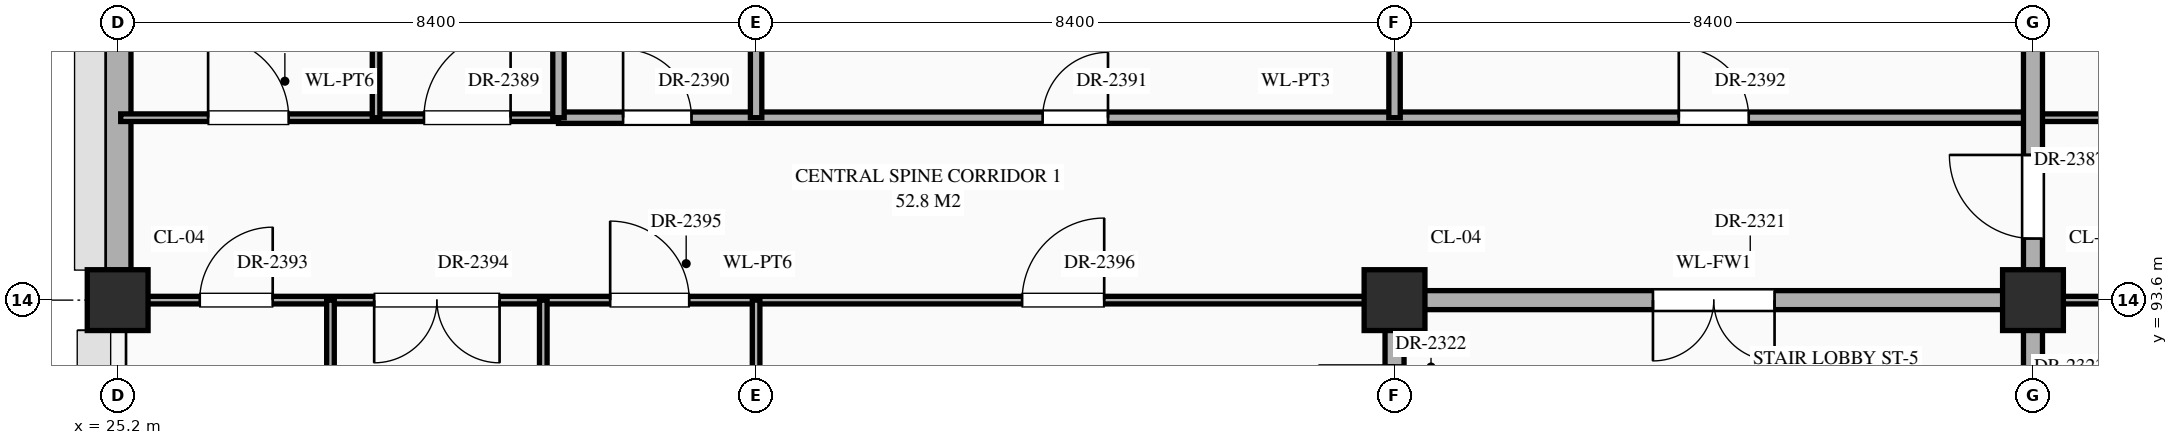
"""IFC4 building model, lengths in metres.
Left out: names, types, materials, properties, quantities, classifications, styles, units other than length and angle.
Written with IfcOpenShell. Run it as: python <this file> out.ifc"""

import sys

from ifc_helpers import new_model, si_unit, direction, frame, frame_2d, origin, origin_2d, place, context, subcontext, project, spatial, rectangle, extrude, element, fill, save


model = new_model("IFC4")
c1 = context("Model", 3, precision=1e-05, world=origin(), true_north=direction((0.0, 1.0)))
c2 = subcontext(c1, "Body", "Model", "MODEL_VIEW")
j1 = project(units=[si_unit("LENGTHUNIT", "METRE"), si_unit("PLANEANGLEUNIT", "RADIAN")], contexts=[c1])
p1 = place(None, origin())
s1 = spatial("IfcSite", under=j1, at=p1, CompositionType="ELEMENT")
p2 = place(p1, origin())
s2 = spatial("IfcBuilding", under=s1, at=p2, CompositionType="ELEMENT")
p3 = place(p2, frame((0.0, 0.0, 30.6)))
s3 = spatial("IfcBuildingStorey", under=s2, at=p3, CompositionType="ELEMENT", Elevation=30.6)
for number, where, z_axis, x_axis in (
    (1, (25.2, 93.6, 0.0), (0.0, 0.0, 1.0), (1.0, 0.0, 0.0)),
    (2, (42.0, 93.6, 0.0), (0.0, 0.0, 1.0), (1.0, 0.0, 0.0)),
    (3, (50.4, 93.6, 0.0), (0.0, 0.0, 1.0), (1.0, 0.0, 0.0)),
):
    element("IfcColumn", number, at=place(p3, frame(where, z_axis=z_axis, x_axis=x_axis)), inside=s3, PredefinedType="COLUMN", context=c2, shape_type="SweptSolid", body=[
        extrude(rectangle(XDim=0.8, YDim=0.8, at=origin_2d()), origin(), (0.0, 0.0, 1.0), 4.5),
    ])
p4 = place(p3, frame((25.2, 93.995, 0.0), z_axis=(0.0, 0.0, 1.0), x_axis=(0.0, 1.0, 0.0)))
e4 = element("IfcWall", 4, at=p4, inside=s3, PredefinedType="STANDARD", context=c2, shape_type="SweptSolid", body=[
    extrude(rectangle(XDim=6.41, YDim=0.35, at=frame_2d((3.205, 0.0))), origin(), (0.0, 0.0, 1.0), 3.65),
])
p5 = place(p4, frame((3.73, 0.0, 0.85)))
e5 = element("IfcOpeningElement", 5, at=p5, cuts=e4, PredefinedType="OPENING", context=c2, shape_type="SweptSolid", body=[
    extrude(rectangle(XDim=1.55, YDim=1.38, at=frame_2d((0.775, 0.69))), frame((0.0, 0.187, 0.0), z_axis=(0.0, -1.0, 0.0), x_axis=(1.0, 0.0, 0.0)), (0.0, 0.0, 1.0), 0.374),
])
p6 = place(p3, frame((25.24, 93.6, 0.0), z_axis=(0.0, 0.0, 1.0), x_axis=(1.0, 0.0, 0.0)))
e6 = element("IfcWall", 6, at=p6, inside=s3, PredefinedType="STANDARD", context=c2, shape_type="SweptSolid", body=[
    extrude(rectangle(XDim=16.76, YDim=0.1, at=frame_2d((8.38, 0.0))), origin(), (0.0, 0.0, 1.0), 3.1),
])
p7 = place(p6, frame((1.04, 0.0, 0.0)))
e7 = element("IfcOpeningElement", 7, at=p7, cuts=e6, PredefinedType="OPENING", context=c2, shape_type="SweptSolid", body=[
    extrude(rectangle(XDim=0.96, YDim=2.2, at=frame_2d((0.48, 1.1))), frame((0.0, 0.062, 0.0), z_axis=(0.0, -1.0, 0.0), x_axis=(1.0, 0.0, 0.0)), (0.0, 0.0, 1.0), 0.124),
])
p8 = place(p6, frame((3.335, 0.0, 0.0)))
e8 = element("IfcOpeningElement", 8, at=p8, cuts=e6, PredefinedType="OPENING", context=c2, shape_type="SweptSolid", body=[
    extrude(rectangle(XDim=1.65, YDim=2.4, at=frame_2d((0.825, 1.2))), frame((0.0, 0.062, 0.0), z_axis=(0.0, -1.0, 0.0), x_axis=(1.0, 0.0, 0.0)), (0.0, 0.0, 1.0), 0.124),
])
p9 = place(p6, frame((6.44, 0.0, 0.0)))
e9 = element("IfcOpeningElement", 9, at=p9, cuts=e6, PredefinedType="OPENING", context=c2, shape_type="SweptSolid", body=[
    extrude(rectangle(XDim=1.04, YDim=2.2, at=frame_2d((0.52, 1.1))), frame((0.0, 0.062, 0.0), z_axis=(0.0, -1.0, 0.0), x_axis=(1.0, 0.0, 0.0)), (0.0, 0.0, 1.0), 0.124),
])
p10 = place(p6, frame((11.86, 0.0, 0.0)))
e10 = element("IfcOpeningElement", 10, at=p10, cuts=e6, PredefinedType="OPENING", context=c2, shape_type="SweptSolid", body=[
    extrude(rectangle(XDim=1.08, YDim=2.25, at=frame_2d((0.54, 1.125))), frame((0.0, 0.062, 0.0), z_axis=(0.0, -1.0, 0.0), x_axis=(1.0, 0.0, 0.0)), (0.0, 0.0, 1.0), 0.124),
])
p11 = place(p3, frame((42.0, 93.6, 0.0), z_axis=(0.0, 0.0, 1.0), x_axis=(1.0, 0.0, 0.0)))
e11 = element("IfcWall", 11, at=p11, inside=s3, PredefinedType="STANDARD", context=c2, shape_type="SweptSolid", body=[
    extrude(rectangle(XDim=8.4, YDim=0.25, at=frame_2d((4.2, 0.0))), origin(), (0.0, 0.0, 1.0), 3.39),
])
p12 = place(p11, frame((3.4, 0.0, 0.0)))
e12 = element("IfcOpeningElement", 12, at=p12, cuts=e11, PredefinedType="OPENING", context=c2, shape_type="SweptSolid", body=[
    extrude(rectangle(XDim=1.6, YDim=2.3, at=frame_2d((0.8, 1.15))), frame((0.0, 0.137, 0.0), z_axis=(0.0, -1.0, 0.0), x_axis=(1.0, 0.0, 0.0)), (0.0, 0.0, 1.0), 0.274),
])
p13 = place(p3, frame((50.4, 93.6, 0.0), z_axis=(0.0, 0.0, 1.0), x_axis=(1.0, 0.0, 0.0)))
e13 = element("IfcWall", 13, at=p13, inside=s3, PredefinedType="STANDARD", context=c2, shape_type="SweptSolid", body=[
    extrude(rectangle(XDim=8.4, YDim=0.1, at=frame_2d((4.2, 0.0))), origin(), (0.0, 0.0, 1.0), 3.39),
])
p14 = place(p13, frame((1.05, 0.0, 0.0)))
e14 = element("IfcOpeningElement", 14, at=p14, cuts=e13, PredefinedType="OPENING", context=c2, shape_type="SweptSolid", body=[
    extrude(rectangle(XDim=1.02, YDim=2.4, at=frame_2d((0.51, 1.2))), frame((0.0, 0.062, 0.0), z_axis=(0.0, -1.0, 0.0), x_axis=(1.0, 0.0, 0.0)), (0.0, 0.0, 1.0), 0.124),
])
p15 = place(p13, frame((3.67, 0.0, 0.0)))
e15 = element("IfcOpeningElement", 15, at=p15, cuts=e13, PredefinedType="OPENING", context=c2, shape_type="SweptSolid", body=[
    extrude(rectangle(XDim=1.06, YDim=2.4, at=frame_2d((0.53, 1.2))), frame((0.0, 0.062, 0.0), z_axis=(0.0, -1.0, 0.0), x_axis=(1.0, 0.0, 0.0)), (0.0, 0.0, 1.0), 0.124),
])
p16 = place(p13, frame((6.27, 0.0, 0.0)))
e16 = element("IfcOpeningElement", 16, at=p16, cuts=e13, PredefinedType="OPENING", context=c2, shape_type="SweptSolid", body=[
    extrude(rectangle(XDim=1.14, YDim=2.4, at=frame_2d((0.57, 1.2))), frame((0.0, 0.062, 0.0), z_axis=(0.0, -1.0, 0.0), x_axis=(1.0, 0.0, 0.0)), (0.0, 0.0, 1.0), 0.124),
])
p17 = place(p3, frame((25.24, 96.0, 0.0), z_axis=(0.0, 0.0, 1.0), x_axis=(1.0, 0.0, 0.0)))
e17 = element("IfcWall", 17, at=p17, inside=s3, PredefinedType="STANDARD", context=c2, shape_type="SweptSolid", body=[
    extrude(rectangle(XDim=5.76, YDim=0.1, at=frame_2d((2.88, 0.0))), origin(), (0.0, 0.0, 1.0), 4.3),
])
p18 = place(p17, frame((1.15, 0.0, 0.0)))
e18 = element("IfcOpeningElement", 18, at=p18, cuts=e17, PredefinedType="OPENING", context=c2, shape_type="SweptSolid", body=[
    extrude(rectangle(XDim=1.06, YDim=2.4, at=frame_2d((0.53, 1.2))), frame((0.0, 0.062, 0.0), z_axis=(0.0, -1.0, 0.0), x_axis=(1.0, 0.0, 0.0)), (0.0, 0.0, 1.0), 0.124),
])
p19 = place(p17, frame((3.99, 0.0, 0.0)))
e19 = element("IfcOpeningElement", 19, at=p19, cuts=e17, PredefinedType="OPENING", context=c2, shape_type="SweptSolid", body=[
    extrude(rectangle(XDim=1.14, YDim=2.4, at=frame_2d((0.57, 1.2))), frame((0.0, 0.062, 0.0), z_axis=(0.0, -1.0, 0.0), x_axis=(1.0, 0.0, 0.0)), (0.0, 0.0, 1.0), 0.124),
])
p20 = place(p3, frame((31.0, 96.0, 0.0), z_axis=(0.0, 0.0, 1.0), x_axis=(1.0, 0.0, 0.0)))
e20 = element("IfcWall", 20, at=p20, inside=s3, PredefinedType="STANDARD", context=c2, shape_type="SweptSolid", body=[
    extrude(rectangle(XDim=19.4, YDim=0.15, at=frame_2d((9.7, 0.0))), origin(), (0.0, 0.0, 1.0), 4.15),
])
p21 = place(p20, frame((0.85, 0.0, 0.0)))
e21 = element("IfcOpeningElement", 21, at=p21, cuts=e20, PredefinedType="OPENING", context=c2, shape_type="SweptSolid", body=[
    extrude(rectangle(XDim=0.9, YDim=2.15, at=frame_2d((0.45, 1.075))), frame((0.0, 0.087, 0.0), z_axis=(0.0, -1.0, 0.0), x_axis=(1.0, 0.0, 0.0)), (0.0, 0.0, 1.0), 0.174),
])
p22 = place(p20, frame((6.37, 0.0, 0.0)))
e22 = element("IfcOpeningElement", 22, at=p22, cuts=e20, PredefinedType="OPENING", context=c2, shape_type="SweptSolid", body=[
    extrude(rectangle(XDim=0.86, YDim=2.1, at=frame_2d((0.43, 1.05))), frame((0.0, 0.087, 0.0), z_axis=(0.0, -1.0, 0.0), x_axis=(1.0, 0.0, 0.0)), (0.0, 0.0, 1.0), 0.174),
])
p23 = place(p20, frame((14.74, 0.0, 0.0)))
e23 = element("IfcOpeningElement", 23, at=p23, cuts=e20, PredefinedType="OPENING", context=c2, shape_type="SweptSolid", body=[
    extrude(rectangle(XDim=0.92, YDim=2.15, at=frame_2d((0.46, 1.075))), frame((0.0, 0.087, 0.0), z_axis=(0.0, -1.0, 0.0), x_axis=(1.0, 0.0, 0.0)), (0.0, 0.0, 1.0), 0.174),
])
p24 = place(p3, frame((50.4, 96.0, 0.0), z_axis=(0.0, 0.0, 1.0), x_axis=(1.0, 0.0, 0.0)))
e24 = element("IfcWall", 24, at=p24, inside=s3, PredefinedType="STANDARD", context=c2, shape_type="SweptSolid", body=[
    extrude(rectangle(XDim=5.8, YDim=0.1, at=frame_2d((2.9, 0.0))), origin(), (0.0, 0.0, 1.0), 4.24),
])
p25 = place(p24, frame((1.12, 0.0, 0.0)))
e25 = element("IfcOpeningElement", 25, at=p25, cuts=e24, PredefinedType="OPENING", context=c2, shape_type="SweptSolid", body=[
    extrude(rectangle(XDim=1.16, YDim=2.3, at=frame_2d((0.58, 1.15))), frame((0.0, 0.062, 0.0), z_axis=(0.0, -1.0, 0.0), x_axis=(1.0, 0.0, 0.0)), (0.0, 0.0, 1.0), 0.124),
])
p26 = place(p24, frame((4.0, 0.0, 0.0)))
e26 = element("IfcOpeningElement", 26, at=p26, cuts=e24, PredefinedType="OPENING", context=c2, shape_type="SweptSolid", body=[
    extrude(rectangle(XDim=1.2, YDim=2.35, at=frame_2d((0.6, 1.175))), frame((0.0, 0.062, 0.0), z_axis=(0.0, -1.0, 0.0), x_axis=(1.0, 0.0, 0.0)), (0.0, 0.0, 1.0), 0.124),
])
p27 = place(p3, frame((28.0, 86.4, 0.0), z_axis=(0.0, 0.0, 1.0), x_axis=(0.0, 1.0, 0.0)))
e27 = element("IfcWall", 27, at=p27, inside=s3, PredefinedType="STANDARD", context=c2, shape_type="SweptSolid", body=[
    extrude(rectangle(XDim=7.2, YDim=0.1, at=frame_2d((3.6, 0.0))), origin(), (0.0, 0.0, 1.0), 4.3),
])
p28 = place(p27, frame((3.15, 0.0, 0.0)))
e28 = element("IfcOpeningElement", 28, at=p28, cuts=e27, PredefinedType="OPENING", context=c2, shape_type="SweptSolid", body=[
    extrude(rectangle(XDim=0.9, YDim=2.15, at=frame_2d((0.45, 1.075))), frame((0.0, 0.062, 0.0), z_axis=(0.0, -1.0, 0.0), x_axis=(1.0, 0.0, 0.0)), (0.0, 0.0, 1.0), 0.124),
])
p29 = place(p3, frame((28.6, 96.0, 0.0), z_axis=(0.0, 0.0, 1.0), x_axis=(0.0, 1.0, 0.0)))
e29 = element("IfcWall", 29, at=p29, inside=s3, PredefinedType="STANDARD", context=c2, shape_type="SweptSolid", body=[
    extrude(rectangle(XDim=4.8, YDim=0.1, at=frame_2d((2.4, 0.0))), origin(), (0.0, 0.0, 1.0), 4.3),
])
p30 = place(p29, frame((1.84, 0.0, 0.0)))
e30 = element("IfcOpeningElement", 30, at=p30, cuts=e29, PredefinedType="OPENING", context=c2, shape_type="SweptSolid", body=[
    extrude(rectangle(XDim=1.12, YDim=2.25, at=frame_2d((0.56, 1.125))), frame((0.0, 0.062, 0.0), z_axis=(0.0, -1.0, 0.0), x_axis=(1.0, 0.0, 0.0)), (0.0, 0.0, 1.0), 0.124),
])
p31 = place(p3, frame((30.8, 86.4, 0.0), z_axis=(0.0, 0.0, 1.0), x_axis=(0.0, 1.0, 0.0)))
e31 = element("IfcWall", 31, at=p31, inside=s3, PredefinedType="STANDARD", context=c2, shape_type="SweptSolid", body=[
    extrude(rectangle(XDim=7.2, YDim=0.1, at=frame_2d((3.6, 0.0))), origin(), (0.0, 0.0, 1.0), 4.3),
])
p32 = place(p31, frame((3.14, 0.0, 0.0)))
e32 = element("IfcOpeningElement", 32, at=p32, cuts=e31, PredefinedType="OPENING", context=c2, shape_type="SweptSolid", body=[
    extrude(rectangle(XDim=0.92, YDim=2.15, at=frame_2d((0.46, 1.075))), frame((0.0, 0.062, 0.0), z_axis=(0.0, -1.0, 0.0), x_axis=(1.0, 0.0, 0.0)), (0.0, 0.0, 1.0), 0.124),
])
p33 = place(p3, frame((31.0, 96.0, 0.0), z_axis=(0.0, 0.0, 1.0), x_axis=(0.0, 1.0, 0.0)))
e33 = element("IfcWall", 33, at=p33, inside=s3, PredefinedType="STANDARD", context=c2, shape_type="SweptSolid", body=[
    extrude(rectangle(XDim=4.8, YDim=0.15, at=frame_2d((2.4, 0.0))), origin(), (0.0, 0.0, 1.0), 4.3),
])
p34 = place(p33, frame((1.82, 0.0, 0.0)))
e34 = element("IfcOpeningElement", 34, at=p34, cuts=e33, PredefinedType="OPENING", context=c2, shape_type="SweptSolid", body=[
    extrude(rectangle(XDim=1.16, YDim=2.3, at=frame_2d((0.58, 1.15))), frame((0.0, 0.087, 0.0), z_axis=(0.0, -1.0, 0.0), x_axis=(1.0, 0.0, 0.0)), (0.0, 0.0, 1.0), 0.174),
])
p35 = place(p3, frame((33.6, 86.4, 0.0), z_axis=(0.0, 0.0, 1.0), x_axis=(0.0, 1.0, 0.0)))
e35 = element("IfcWall", 35, at=p35, inside=s3, PredefinedType="STANDARD", context=c2, shape_type="SweptSolid", body=[
    extrude(rectangle(XDim=7.2, YDim=0.1, at=frame_2d((3.6, 0.0))), origin(), (0.0, 0.0, 1.0), 4.3),
])
p36 = place(p3, frame((33.6, 96.0, 0.0), z_axis=(0.0, 0.0, 1.0), x_axis=(0.0, 1.0, 0.0)))
e36 = element("IfcWall", 36, at=p36, inside=s3, PredefinedType="STANDARD", context=c2, shape_type="SweptSolid", body=[
    extrude(rectangle(XDim=4.8, YDim=0.15, at=frame_2d((2.4, 0.0))), origin(), (0.0, 0.0, 1.0), 4.3),
])
p37 = place(p3, frame((42.0, 91.2, 0.0), z_axis=(0.0, 0.0, 1.0), x_axis=(0.0, 1.0, 0.0)))
e37 = element("IfcWall", 37, at=p37, inside=s3, PredefinedType="STANDARD", context=c2, shape_type="SweptSolid", body=[
    extrude(rectangle(XDim=2.4, YDim=0.25, at=frame_2d((1.2, 0.0))), origin(), (0.0, 0.0, 1.0), 3.4),
])
p38 = place(p37, frame((0.54, 0.0, 0.0)))
e38 = element("IfcOpeningElement", 38, at=p38, cuts=e37, PredefinedType="OPENING", context=c2, shape_type="SweptSolid", body=[
    extrude(rectangle(XDim=1.0, YDim=2.2, at=frame_2d((0.5, 1.1))), frame((0.0, 0.137, 0.0), z_axis=(0.0, -1.0, 0.0), x_axis=(1.0, 0.0, 0.0)), (0.0, 0.0, 1.0), 0.274),
])
p39 = place(p3, frame((42.0, 96.0, 0.0), z_axis=(0.0, 0.0, 1.0), x_axis=(0.0, 1.0, 0.0)))
e39 = element("IfcWall", 39, at=p39, inside=s3, PredefinedType="STANDARD", context=c2, shape_type="SweptSolid", body=[
    extrude(rectangle(XDim=4.8, YDim=0.15, at=frame_2d((2.4, 0.0))), origin(), (0.0, 0.0, 1.0), 3.4),
])
p40 = place(p3, frame((50.4, 91.2, 0.0), z_axis=(0.0, 0.0, 1.0), x_axis=(0.0, 1.0, 0.0)))
e40 = element("IfcWall", 40, at=p40, inside=s3, PredefinedType="STANDARD", context=c2, shape_type="SweptSolid", body=[
    extrude(rectangle(XDim=13.2, YDim=0.25, at=frame_2d((6.6, 0.0))), origin(), (0.0, 0.0, 1.0), 3.49),
])
p41 = place(p40, frame((0.565, 0.0, 0.0)))
e41 = element("IfcOpeningElement", 41, at=p41, cuts=e40, PredefinedType="OPENING", context=c2, shape_type="SweptSolid", body=[
    extrude(rectangle(XDim=0.95, YDim=2.15, at=frame_2d((0.475, 1.075))), frame((0.0, 0.137, 0.0), z_axis=(0.0, -1.0, 0.0), x_axis=(1.0, 0.0, 0.0)), (0.0, 0.0, 1.0), 0.274),
])
p42 = place(p40, frame((10.46, 0.0, 0.0)))
e42 = element("IfcOpeningElement", 42, at=p42, cuts=e40, PredefinedType="OPENING", context=c2, shape_type="SweptSolid", body=[
    extrude(rectangle(XDim=1.0, YDim=2.2, at=frame_2d((0.5, 1.1))), frame((0.0, 0.137, 0.0), z_axis=(0.0, -1.0, 0.0), x_axis=(1.0, 0.0, 0.0)), (0.0, 0.0, 1.0), 0.274),
])
p43 = place(p40, frame((3.21, 0.0, 0.0)))
e43 = element("IfcOpeningElement", 43, at=p43, cuts=e40, PredefinedType="OPENING", context=c2, shape_type="SweptSolid", body=[
    extrude(rectangle(XDim=1.1, YDim=2.2, at=frame_2d((0.55, 1.1))), frame((0.0, 0.137, 0.0), z_axis=(0.0, -1.0, 0.0), x_axis=(1.0, 0.0, 0.0)), (0.0, 0.0, 1.0), 0.274),
])
p44 = place(p12, frame((1.6, 0.0, 0.0), z_axis=(0.0, 0.0, 1.0), x_axis=(-1.0, 0.0, 0.0)))
e44 = element("IfcDoor", 44, at=p44, inside=s3, OperationType="DOUBLE_DOOR_SINGLE_SWING", PredefinedType="DOOR", context=c2, shape_type="SweptSolid", body=[
    extrude(rectangle(XDim=1.6, YDim=2.3, at=frame_2d((0.8, 1.15))), frame((0.0, 0.025, 0.0), z_axis=(0.0, -1.0, 0.0), x_axis=(1.0, 0.0, 0.0)), (0.0, 0.0, 1.0), 0.05),
])
fill(e12, e44)
p45 = place(p43, origin())
e45 = element("IfcDoor", 45, at=p45, inside=s3, OperationType="SINGLE_SWING_RIGHT", PredefinedType="DOOR", context=c2, shape_type="SweptSolid", body=[
    extrude(rectangle(XDim=1.1, YDim=2.2, at=frame_2d((0.55, 1.1))), frame((0.0, 0.025, 0.0), z_axis=(0.0, -1.0, 0.0), x_axis=(1.0, 0.0, 0.0)), (0.0, 0.0, 1.0), 0.05),
])
fill(e43, e45)
p46 = place(p18, origin())
e46 = element("IfcDoor", 46, at=p46, inside=s3, OperationType="SINGLE_SWING_LEFT", PredefinedType="DOOR", context=c2, shape_type="SweptSolid", body=[
    extrude(rectangle(XDim=1.06, YDim=2.4, at=frame_2d((0.53, 1.2))), frame((0.0, 0.025, 0.0), z_axis=(0.0, -1.0, 0.0), x_axis=(1.0, 0.0, 0.0)), (0.0, 0.0, 1.0), 0.05),
])
fill(e18, e46)
p47 = place(p19, origin())
e47 = element("IfcDoor", 47, at=p47, inside=s3, OperationType="SINGLE_SWING_RIGHT", PredefinedType="DOOR", context=c2, shape_type="SweptSolid", body=[
    extrude(rectangle(XDim=1.14, YDim=2.4, at=frame_2d((0.57, 1.2))), frame((0.0, 0.025, 0.0), z_axis=(0.0, -1.0, 0.0), x_axis=(1.0, 0.0, 0.0)), (0.0, 0.0, 1.0), 0.05),
])
fill(e19, e47)
p48 = place(p21, origin())
e48 = element("IfcDoor", 48, at=p48, inside=s3, OperationType="SINGLE_SWING_LEFT", PredefinedType="DOOR", context=c2, shape_type="SweptSolid", body=[
    extrude(rectangle(XDim=0.9, YDim=2.15, at=frame_2d((0.45, 1.075))), frame((0.0, 0.025, 0.0), z_axis=(0.0, -1.0, 0.0), x_axis=(1.0, 0.0, 0.0)), (0.0, 0.0, 1.0), 0.05),
])
fill(e21, e48)
p49 = place(p22, origin())
e49 = element("IfcDoor", 49, at=p49, inside=s3, OperationType="SINGLE_SWING_RIGHT", PredefinedType="DOOR", context=c2, shape_type="SweptSolid", body=[
    extrude(rectangle(XDim=0.86, YDim=2.1, at=frame_2d((0.43, 1.05))), frame((0.0, 0.025, 0.0), z_axis=(0.0, -1.0, 0.0), x_axis=(1.0, 0.0, 0.0)), (0.0, 0.0, 1.0), 0.05),
])
fill(e22, e49)
p50 = place(p23, origin())
e50 = element("IfcDoor", 50, at=p50, inside=s3, OperationType="SINGLE_SWING_LEFT", PredefinedType="DOOR", context=c2, shape_type="SweptSolid", body=[
    extrude(rectangle(XDim=0.92, YDim=2.15, at=frame_2d((0.46, 1.075))), frame((0.0, 0.025, 0.0), z_axis=(0.0, -1.0, 0.0), x_axis=(1.0, 0.0, 0.0)), (0.0, 0.0, 1.0), 0.05),
])
fill(e23, e50)
p51 = place(p7, origin())
e51 = element("IfcDoor", 51, at=p51, inside=s3, OperationType="SINGLE_SWING_RIGHT", PredefinedType="DOOR", context=c2, shape_type="SweptSolid", body=[
    extrude(rectangle(XDim=0.96, YDim=2.2, at=frame_2d((0.48, 1.1))), frame((0.0, 0.025, 0.0), z_axis=(0.0, -1.0, 0.0), x_axis=(1.0, 0.0, 0.0)), (0.0, 0.0, 1.0), 0.05),
])
fill(e7, e51)
p52 = place(p8, frame((1.65, 0.0, 0.0), z_axis=(0.0, 0.0, 1.0), x_axis=(-1.0, 0.0, 0.0)))
e52 = element("IfcDoor", 52, at=p52, inside=s3, OperationType="DOUBLE_DOOR_SINGLE_SWING", PredefinedType="DOOR", context=c2, shape_type="SweptSolid", body=[
    extrude(rectangle(XDim=1.65, YDim=2.4, at=frame_2d((0.825, 1.2))), frame((0.0, 0.025, 0.0), z_axis=(0.0, -1.0, 0.0), x_axis=(1.0, 0.0, 0.0)), (0.0, 0.0, 1.0), 0.05),
])
fill(e8, e52)
p53 = place(p9, origin())
e53 = element("IfcDoor", 53, at=p53, inside=s3, OperationType="SINGLE_SWING_LEFT", PredefinedType="DOOR", context=c2, shape_type="SweptSolid", body=[
    extrude(rectangle(XDim=1.04, YDim=2.2, at=frame_2d((0.52, 1.1))), frame((0.0, 0.025, 0.0), z_axis=(0.0, -1.0, 0.0), x_axis=(1.0, 0.0, 0.0)), (0.0, 0.0, 1.0), 0.05),
])
fill(e9, e53)
p54 = place(p10, origin())
e54 = element("IfcDoor", 54, at=p54, inside=s3, OperationType="SINGLE_SWING_RIGHT", PredefinedType="DOOR", context=c2, shape_type="SweptSolid", body=[
    extrude(rectangle(XDim=1.08, YDim=2.25, at=frame_2d((0.54, 1.125))), frame((0.0, 0.025, 0.0), z_axis=(0.0, -1.0, 0.0), x_axis=(1.0, 0.0, 0.0)), (0.0, 0.0, 1.0), 0.05),
])
fill(e10, e54)
save(model, sys.argv[1])
